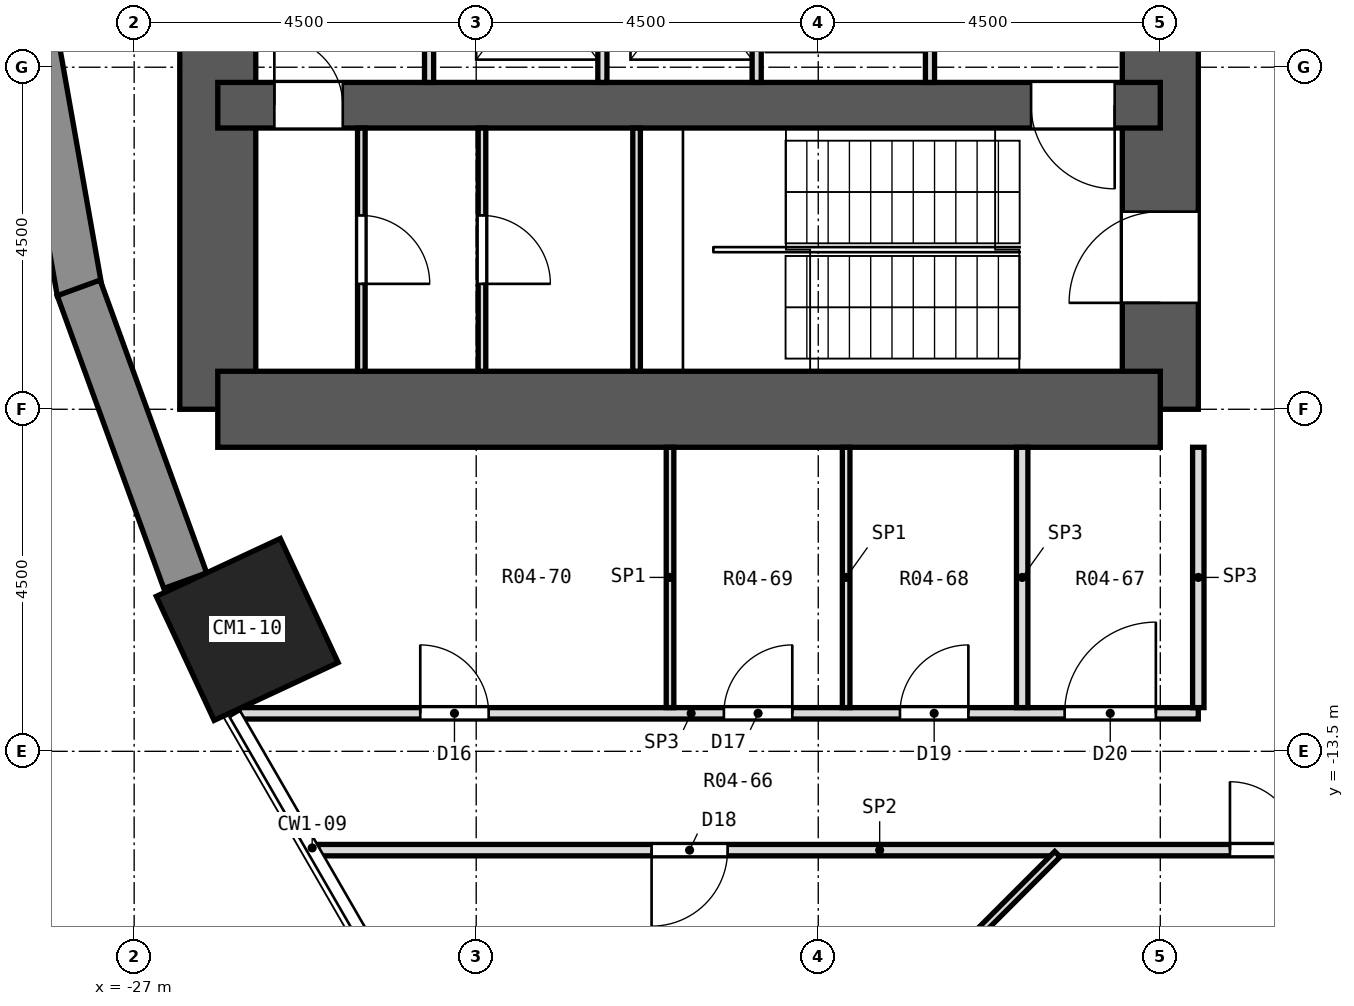
"""IFC4 building model, lengths in metres.
Left out: names, types, materials, properties, quantities, classifications, styles, units other than length and angle.
Written with IfcOpenShell. Run it as: python <this file> out.ifc"""

import sys

from ifc_helpers import new_model, si_unit, direction, frame, frame_2d, origin, origin_2d, place, context, subcontext, project, spatial, rectangle, extrude, element, fill, save


model = new_model("IFC4")
c1 = context("Model", 3, precision=1e-05, world=origin(), true_north=direction((0.0, 1.0)))
c2 = subcontext(c1, "Body", "Model", "MODEL_VIEW")
j1 = project(units=[si_unit("LENGTHUNIT", "METRE"), si_unit("PLANEANGLEUNIT", "RADIAN")], contexts=[c1])
p1 = place(None, origin())
s1 = spatial("IfcSite", under=j1, at=p1, CompositionType="ELEMENT")
p2 = place(p1, origin())
s2 = spatial("IfcBuilding", under=s1, at=p2, CompositionType="ELEMENT")
p3 = place(p2, frame((0.0, 0.0, 5.0)))
s3 = spatial("IfcBuildingStorey", under=s2, at=p3, CompositionType="ELEMENT", Elevation=5.0)
p4 = place(p3, frame((-25.512, -11.897, 0.0), z_axis=(0.0, 0.0, 1.0), x_axis=(-0.906307787037, -0.422618261741, 0.0)))
e1 = element("IfcColumn", 1, at=p4, inside=s3, PredefinedType="COLUMN", context=c2, shape_type="SweptSolid", body=[
    extrude(rectangle(XDim=1.8, YDim=1.8, at=origin_2d()), origin(), (0.0, 0.0, 1.0), 4.2),
])
p5 = place(p3, frame((-13.5, -9.0, 0.0), z_axis=(0.0, 0.0, 1.0), x_axis=(0.0, 1.0, 0.0)))
e2 = element("IfcWall", 2, at=p5, inside=s3, PredefinedType="SHEAR", context=c2, shape_type="SweptSolid", body=[
    extrude(rectangle(XDim=18.0, YDim=1.0, at=frame_2d((9.0, 0.0))), origin(), (0.0, 0.0, 1.0), 4.2),
])
p6 = place(p5, frame((15.4, 0.0, 0.0)))
e3 = element("IfcOpeningElement", 3, at=p6, cuts=e2, PredefinedType="OPENING", context=c2, shape_type="SweptSolid", body=[
    extrude(rectangle(XDim=1.2, YDim=2.1, at=frame_2d((0.6, 1.05))), frame((0.0, 0.512, 0.0), z_axis=(0.0, -1.0, 0.0), x_axis=(1.0, 0.0, 0.0)), (0.0, 0.0, 1.0), 1.024),
])
p7 = place(p5, frame((1.4, 0.0, 0.0)))
e4 = element("IfcOpeningElement", 4, at=p7, cuts=e2, PredefinedType="OPENING", context=c2, shape_type="SweptSolid", body=[
    extrude(rectangle(XDim=1.2, YDim=2.1, at=frame_2d((0.6, 1.05))), frame((0.0, 0.512, 0.0), z_axis=(0.0, -1.0, 0.0), x_axis=(1.0, 0.0, 0.0)), (0.0, 0.0, 1.0), 1.024),
])
p8 = place(p5, frame((7.5, 0.0, 0.0)))
e5 = element("IfcOpeningElement", 5, at=p8, cuts=e2, PredefinedType="OPENING", context=c2, shape_type="SweptSolid", body=[
    extrude(rectangle(XDim=3.0, YDim=2.4, at=frame_2d((1.5, 1.2))), frame((0.0, 0.512, 0.0), z_axis=(0.0, -1.0, 0.0), x_axis=(1.0, 0.0, 0.0)), (0.0, 0.0, 1.0), 1.024),
])
p9 = place(p3, frame((-25.9, -9.0, 0.0), z_axis=(0.0, 0.0, 1.0), x_axis=(0.0, 1.0, 0.0)))
e6 = element("IfcWall", 6, at=p9, inside=s3, PredefinedType="SHEAR", context=c2, shape_type="SweptSolid", body=[
    extrude(rectangle(XDim=18.0, YDim=1.0, at=frame_2d((9.0, 0.0))), origin(), (0.0, 0.0, 1.0), 4.2),
])
p10 = place(p3, frame((-13.5, -9.0, 0.0), z_axis=(0.0, 0.0, 1.0), x_axis=(-1.0, 0.0, 0.0)))
e7 = element("IfcWall", 7, at=p10, inside=s3, PredefinedType="SHEAR", context=c2, shape_type="SweptSolid", body=[
    extrude(rectangle(XDim=12.4, YDim=1.0, at=frame_2d((6.2, 0.0))), origin(), (0.0, 0.0, 1.0), 4.2),
])
p11 = place(p3, frame((-13.5, -5.0, 0.0), z_axis=(0.0, 0.0, 1.0), x_axis=(-1.0, 0.0, 0.0)))
e8 = element("IfcWall", 8, at=p11, inside=s3, PredefinedType="SHEAR", context=c2, shape_type="SweptSolid", body=[
    extrude(rectangle(XDim=12.4, YDim=0.6, at=frame_2d((6.2, 0.0))), origin(), (0.0, 0.0, 1.0), 4.2),
])
p12 = place(p11, frame((10.756, 0.0, 0.0)))
e9 = element("IfcOpeningElement", 9, at=p12, cuts=e8, PredefinedType="OPENING", context=c2, shape_type="SweptSolid", body=[
    extrude(rectangle(XDim=0.9, YDim=2.1, at=frame_2d((0.45, 1.05))), frame((0.0, 0.312, 0.0), z_axis=(0.0, -1.0, 0.0), x_axis=(1.0, 0.0, 0.0)), (0.0, 0.0, 1.0), 0.624),
])
p13 = place(p11, frame((0.6, 0.0, 0.0)))
e10 = element("IfcOpeningElement", 10, at=p13, cuts=e8, PredefinedType="OPENING", context=c2, shape_type="SweptSolid", body=[
    extrude(rectangle(XDim=1.1, YDim=2.1, at=frame_2d((0.55, 1.05))), frame((0.0, 0.312, 0.0), z_axis=(0.0, -1.0, 0.0), x_axis=(1.0, 0.0, 0.0)), (0.0, 0.0, 1.0), 0.624),
])
p14 = place(p3, frame((-28.428, -3.417, 0.0), z_axis=(0.0, 0.0, 1.0), x_axis=(0.173673210505, -0.984803338719, 0.0)))
e11 = element("IfcWall", 11, at=p14, inside=s3, PredefinedType="SOLIDWALL", context=c2, shape_type="SweptSolid", body=[
    extrude(rectangle(XDim=4.099, YDim=0.6, at=frame_2d((2.05, 0.0))), origin(), (0.0, 0.0, 1.0), 3.65),
])
p15 = place(p3, frame((-27.73, -7.403, 0.0), z_axis=(0.0, 0.0, 1.0), x_axis=(0.342034744565, -0.939687306241, 0.0)))
e12 = element("IfcWall", 12, at=p15, inside=s3, PredefinedType="SOLIDWALL", context=c2, shape_type="SweptSolid", body=[
    extrude(rectangle(XDim=4.099, YDim=0.6, at=frame_2d((2.05, 0.0))), origin(), (0.0, 0.0, 1.0), 3.65),
])
p16 = place(p3, frame((-24.583, -14.8, 0.0), z_axis=(0.0, 0.0, 1.0), x_axis=(1.0, 0.0, 0.0)))
e13 = element("IfcWall", 13, at=p16, inside=s3, PredefinedType="PARTITIONING", context=c2, shape_type="SweptSolid", body=[
    extrude(rectangle(XDim=14.783, YDim=0.15, at=frame_2d((7.392, 0.0))), origin(), (0.0, 0.0, 1.0), 3.65),
])
p17 = place(p16, frame((4.39, 0.0, 0.0)))
e14 = element("IfcOpeningElement", 14, at=p17, cuts=e13, PredefinedType="OPENING", context=c2, shape_type="SweptSolid", body=[
    extrude(rectangle(XDim=1.0, YDim=2.1, at=frame_2d((0.5, 1.05))), frame((0.0, 0.087, 0.0), z_axis=(0.0, -1.0, 0.0), x_axis=(1.0, 0.0, 0.0)), (0.0, 0.0, 1.0), 0.174),
])
p18 = place(p16, frame((12.0, 0.0, 0.0)))
e15 = element("IfcOpeningElement", 15, at=p18, cuts=e13, PredefinedType="OPENING", context=c2, shape_type="SweptSolid", body=[
    extrude(rectangle(XDim=1.8, YDim=2.1, at=frame_2d((0.9, 1.05))), frame((0.0, 0.087, 0.0), z_axis=(0.0, -1.0, 0.0), x_axis=(1.0, 0.0, 0.0)), (0.0, 0.0, 1.0), 0.174),
])
p19 = place(p3, frame((-25.622, -13.0, 0.0), z_axis=(0.0, 0.0, 1.0), x_axis=(1.0, 0.0, 0.0)))
e16 = element("IfcWall", 16, at=p19, inside=s3, PredefinedType="PARTITIONING", context=c2, shape_type="SweptSolid", body=[
    extrude(rectangle(XDim=12.622, YDim=0.15, at=frame_2d((6.311, 0.0))), origin(), (0.0, 0.0, 1.0), 3.65),
])
p20 = place(p19, frame((2.386, 0.0, 0.0)))
e17 = element("IfcOpeningElement", 17, at=p20, cuts=e16, PredefinedType="OPENING", context=c2, shape_type="SweptSolid", body=[
    extrude(rectangle(XDim=0.9, YDim=2.1, at=frame_2d((0.45, 1.05))), frame((0.0, 0.087, 0.0), z_axis=(0.0, -1.0, 0.0), x_axis=(1.0, 0.0, 0.0)), (0.0, 0.0, 1.0), 0.174),
])
p21 = place(p19, frame((6.381, 0.0, 0.0)))
e18 = element("IfcOpeningElement", 18, at=p21, cuts=e16, PredefinedType="OPENING", context=c2, shape_type="SweptSolid", body=[
    extrude(rectangle(XDim=0.9, YDim=2.1, at=frame_2d((0.45, 1.05))), frame((0.0, 0.087, 0.0), z_axis=(0.0, -1.0, 0.0), x_axis=(1.0, 0.0, 0.0)), (0.0, 0.0, 1.0), 0.174),
])
p22 = place(p19, frame((8.697, 0.0, 0.0)))
e19 = element("IfcOpeningElement", 19, at=p22, cuts=e16, PredefinedType="OPENING", context=c2, shape_type="SweptSolid", body=[
    extrude(rectangle(XDim=0.9, YDim=2.1, at=frame_2d((0.45, 1.05))), frame((0.0, 0.087, 0.0), z_axis=(0.0, -1.0, 0.0), x_axis=(1.0, 0.0, 0.0)), (0.0, 0.0, 1.0), 0.174),
])
p23 = place(p19, frame((10.864, 0.0, 0.0)))
e20 = element("IfcOpeningElement", 20, at=p23, cuts=e16, PredefinedType="OPENING", context=c2, shape_type="SweptSolid", body=[
    extrude(rectangle(XDim=1.2, YDim=2.1, at=frame_2d((0.6, 1.05))), frame((0.0, 0.087, 0.0), z_axis=(0.0, -1.0, 0.0), x_axis=(1.0, 0.0, 0.0)), (0.0, 0.0, 1.0), 0.174),
])
p24 = place(p3, frame((-19.262, -19.262, 0.0), z_axis=(0.0, 0.0, 1.0), x_axis=(0.707106781187, 0.707106781187, 0.0)))
e21 = element("IfcWall", 21, at=p24, inside=s3, PredefinedType="PARTITIONING", context=c2, shape_type="SweptSolid", body=[
    extrude(rectangle(XDim=6.235, YDim=0.1, at=frame_2d((3.117, 0.0))), origin(), (0.0, 0.0, 1.0), 3.65),
])
p25 = place(p3, frame((-16.519, -23.591, 0.0), z_axis=(0.0, 0.0, 1.0), x_axis=(0.573602246075, 0.81913397152, 0.0)))
e22 = element("IfcWall", 22, at=p25, inside=s3, PredefinedType="PARTITIONING", context=c2, shape_type="SweptSolid", body=[
    extrude(rectangle(XDim=10.657, YDim=0.1, at=frame_2d((5.329, 0.0))), origin(), (0.0, 0.0, 1.0), 3.65),
])
p26 = place(p25, frame((4.866, 0.0, 0.0)))
e23 = element("IfcOpeningElement", 23, at=p26, cuts=e22, PredefinedType="OPENING", context=c2, shape_type="SweptSolid", body=[
    extrude(rectangle(XDim=1.0, YDim=2.1, at=frame_2d((0.5, 1.05))), frame((0.0, 0.062, 0.0), z_axis=(0.0, -1.0, 0.0), x_axis=(1.0, 0.0, 0.0)), (0.0, 0.0, 1.0), 0.124),
])
for number, where, z_axis, x_axis in (
    (24, (-13.0, -12.925, 0.0), (0.0, 0.0, 1.0), (0.0, 1.0, 0.0)),
    (25, (-15.317, -12.925, 0.0), (0.0, 0.0, 1.0), (0.0, 1.0, 0.0)),
):
    element("IfcWall", number, at=place(p3, frame(where, z_axis=z_axis, x_axis=x_axis)), inside=s3, PredefinedType="PARTITIONING", context=c2, shape_type="SweptSolid", body=[
        extrude(rectangle(XDim=3.425, YDim=0.15, at=frame_2d((1.712, 0.0))), origin(), (0.0, 0.0, 1.0), 3.65),
    ])
for number, where, z_axis, x_axis in (
    (26, (-17.633, -12.925, 0.0), (0.0, 0.0, 1.0), (0.0, 1.0, 0.0)),
    (27, (-19.95, -12.925, 0.0), (0.0, 0.0, 1.0), (0.0, 1.0, 0.0)),
):
    element("IfcWall", number, at=place(p3, frame(where, z_axis=z_axis, x_axis=x_axis)), inside=s3, PredefinedType="PARTITIONING", context=c2, shape_type="SweptSolid", body=[
        extrude(rectangle(XDim=3.425, YDim=0.1, at=frame_2d((1.712, 0.0))), origin(), (0.0, 0.0, 1.0), 3.65),
    ])
p27 = place(p3, frame((-16.53, -4.7, 0.0), z_axis=(0.0, 0.0, 1.0), x_axis=(0.0, 1.0, 0.0)))
e28 = element("IfcWall", 28, at=p27, inside=s3, PredefinedType="PARTITIONING", context=c2, shape_type="SweptSolid", body=[
    extrude(rectangle(XDim=2.4, YDim=0.12, at=frame_2d((1.2, 0.0))), origin(), (0.0, 0.0, 1.0), 3.65),
])
p28 = place(p27, frame((0.65, 0.0, 0.0)))
e29 = element("IfcOpeningElement", 29, at=p28, cuts=e28, PredefinedType="OPENING", context=c2, shape_type="SweptSolid", body=[
    extrude(rectangle(XDim=1.1, YDim=2.1, at=frame_2d((0.55, 1.05))), frame((0.0, 0.072, 0.0), z_axis=(0.0, -1.0, 0.0), x_axis=(1.0, 0.0, 0.0)), (0.0, 0.0, 1.0), 0.144),
])
for number, where, z_axis, x_axis in (
    (30, (-18.81, -4.7, 0.0), (0.0, 0.0, 1.0), (0.0, 1.0, 0.0)),
    (31, (-20.84, -4.7, 0.0), (0.0, 0.0, 1.0), (0.0, 1.0, 0.0)),
    (32, (-23.12, -4.7, 0.0), (0.0, 0.0, 1.0), (0.0, 1.0, 0.0)),
):
    element("IfcWall", number, at=place(p3, frame(where, z_axis=z_axis, x_axis=x_axis)), inside=s3, PredefinedType="PARTITIONING", context=c2, shape_type="SweptSolid", body=[
        extrude(rectangle(XDim=2.4, YDim=0.12, at=frame_2d((1.2, 0.0))), origin(), (0.0, 0.0, 1.0), 3.65),
    ])
p29 = place(p3, frame((-20.39, -8.5, 0.0), z_axis=(0.0, 0.0, 1.0), x_axis=(0.0, 1.0, 0.0)))
e33 = element("IfcWall", 33, at=p29, inside=s3, PredefinedType="PARTITIONING", context=c2, shape_type="SweptSolid", body=[
    extrude(rectangle(XDim=3.2, YDim=0.1, at=frame_2d((1.6, 0.0))), origin(), (0.0, 0.0, 1.0), 3.65),
])
p30 = place(p3, frame((-22.424, -8.5, 0.0), z_axis=(0.0, 0.0, 1.0), x_axis=(0.0, 1.0, 0.0)))
e34 = element("IfcWall", 34, at=p30, inside=s3, PredefinedType="PARTITIONING", context=c2, shape_type="SweptSolid", body=[
    extrude(rectangle(XDim=3.2, YDim=0.1, at=frame_2d((1.6, 0.0))), origin(), (0.0, 0.0, 1.0), 3.65),
])
p31 = place(p30, frame((1.15, 0.0, 0.0)))
e35 = element("IfcOpeningElement", 35, at=p31, cuts=e34, PredefinedType="OPENING", context=c2, shape_type="SweptSolid", body=[
    extrude(rectangle(XDim=0.9, YDim=2.1, at=frame_2d((0.45, 1.05))), frame((0.0, 0.062, 0.0), z_axis=(0.0, -1.0, 0.0), x_axis=(1.0, 0.0, 0.0)), (0.0, 0.0, 1.0), 0.124),
])
p32 = place(p3, frame((-24.011, -8.5, 0.0), z_axis=(0.0, 0.0, 1.0), x_axis=(0.0, 1.0, 0.0)))
e36 = element("IfcWall", 36, at=p32, inside=s3, PredefinedType="PARTITIONING", context=c2, shape_type="SweptSolid", body=[
    extrude(rectangle(XDim=3.2, YDim=0.1, at=frame_2d((1.6, 0.0))), origin(), (0.0, 0.0, 1.0), 3.65),
])
p33 = place(p32, frame((1.15, 0.0, 0.0)))
e37 = element("IfcOpeningElement", 37, at=p33, cuts=e36, PredefinedType="OPENING", context=c2, shape_type="SweptSolid", body=[
    extrude(rectangle(XDim=0.9, YDim=2.1, at=frame_2d((0.45, 1.05))), frame((0.0, 0.062, 0.0), z_axis=(0.0, -1.0, 0.0), x_axis=(1.0, 0.0, 0.0)), (0.0, 0.0, 1.0), 0.124),
])
p34 = place(p20, origin())
e38 = element("IfcDoor", 38, at=p34, inside=s3, OperationType="SINGLE_SWING_LEFT", PredefinedType="DOOR", context=c2, shape_type="SweptSolid", body=[
    extrude(rectangle(XDim=0.9, YDim=2.1, at=frame_2d((0.45, 1.05))), frame((0.0, 0.025, 0.0), z_axis=(0.0, -1.0, 0.0), x_axis=(1.0, 0.0, 0.0)), (0.0, 0.0, 1.0), 0.05),
])
fill(e17, e38)
p35 = place(p21, origin())
e39 = element("IfcDoor", 39, at=p35, inside=s3, OperationType="SINGLE_SWING_RIGHT", PredefinedType="DOOR", context=c2, shape_type="SweptSolid", body=[
    extrude(rectangle(XDim=0.9, YDim=2.1, at=frame_2d((0.45, 1.05))), frame((0.0, 0.025, 0.0), z_axis=(0.0, -1.0, 0.0), x_axis=(1.0, 0.0, 0.0)), (0.0, 0.0, 1.0), 0.05),
])
fill(e18, e39)
p36 = place(p17, frame((1.0, 0.0, 0.0), z_axis=(0.0, 0.0, 1.0), x_axis=(-1.0, 0.0, 0.0)))
e40 = element("IfcDoor", 40, at=p36, inside=s3, OperationType="SINGLE_SWING_RIGHT", PredefinedType="DOOR", context=c2, shape_type="SweptSolid", body=[
    extrude(rectangle(XDim=1.0, YDim=2.1, at=frame_2d((0.5, 1.05))), frame((0.0, 0.025, 0.0), z_axis=(0.0, -1.0, 0.0), x_axis=(1.0, 0.0, 0.0)), (0.0, 0.0, 1.0), 0.05),
])
fill(e14, e40)
p37 = place(p22, origin())
e41 = element("IfcDoor", 41, at=p37, inside=s3, OperationType="SINGLE_SWING_RIGHT", PredefinedType="DOOR", context=c2, shape_type="SweptSolid", body=[
    extrude(rectangle(XDim=0.9, YDim=2.1, at=frame_2d((0.45, 1.05))), frame((0.0, 0.025, 0.0), z_axis=(0.0, -1.0, 0.0), x_axis=(1.0, 0.0, 0.0)), (0.0, 0.0, 1.0), 0.05),
])
fill(e19, e41)
p38 = place(p23, origin())
e42 = element("IfcDoor", 42, at=p38, inside=s3, OperationType="SINGLE_SWING_RIGHT", PredefinedType="DOOR", context=c2, shape_type="SweptSolid", body=[
    extrude(rectangle(XDim=1.2, YDim=2.1, at=frame_2d((0.6, 1.05))), frame((0.0, 0.025, 0.0), z_axis=(0.0, -1.0, 0.0), x_axis=(1.0, 0.0, 0.0)), (0.0, 0.0, 1.0), 0.05),
])
fill(e20, e42)
p39 = place(p18, origin())
e43 = element("IfcDoor", 43, at=p39, inside=s3, OperationType="DOUBLE_DOOR_SINGLE_SWING", PredefinedType="DOOR", context=c2, shape_type="SweptSolid", body=[
    extrude(rectangle(XDim=1.8, YDim=2.1, at=frame_2d((0.9, 1.05))), frame((0.0, 0.025, 0.0), z_axis=(0.0, -1.0, 0.0), x_axis=(1.0, 0.0, 0.0)), (0.0, 0.0, 1.0), 0.05),
])
fill(e15, e43)
p40 = place(p33, frame((0.9, 0.0, 0.0), z_axis=(0.0, 0.0, 1.0), x_axis=(-1.0, 0.0, 0.0)))
e44 = element("IfcDoor", 44, at=p40, inside=s3, OperationType="SINGLE_SWING_RIGHT", PredefinedType="DOOR", context=c2, shape_type="SweptSolid", body=[
    extrude(rectangle(XDim=0.9, YDim=2.1, at=frame_2d((0.45, 1.05))), frame((0.0, 0.025, 0.0), z_axis=(0.0, -1.0, 0.0), x_axis=(1.0, 0.0, 0.0)), (0.0, 0.0, 1.0), 0.05),
])
fill(e37, e44)
p41 = place(p31, frame((0.9, 0.0, 0.0), z_axis=(0.0, 0.0, 1.0), x_axis=(-1.0, 0.0, 0.0)))
e45 = element("IfcDoor", 45, at=p41, inside=s3, OperationType="SINGLE_SWING_RIGHT", PredefinedType="DOOR", context=c2, shape_type="SweptSolid", body=[
    extrude(rectangle(XDim=0.9, YDim=2.1, at=frame_2d((0.45, 1.05))), frame((0.0, 0.025, 0.0), z_axis=(0.0, -1.0, 0.0), x_axis=(1.0, 0.0, 0.0)), (0.0, 0.0, 1.0), 0.05),
])
fill(e35, e45)
p42 = place(p12, frame((0.9, 0.0, 0.0), z_axis=(0.0, 0.0, 1.0), x_axis=(-1.0, 0.0, 0.0)))
e46 = element("IfcDoor", 46, at=p42, inside=s3, OperationType="SINGLE_SWING_LEFT", PredefinedType="DOOR", context=c2, shape_type="SweptSolid", body=[
    extrude(rectangle(XDim=0.9, YDim=2.1, at=frame_2d((0.45, 1.05))), frame((0.0, 0.025, 0.0), z_axis=(0.0, -1.0, 0.0), x_axis=(1.0, 0.0, 0.0)), (0.0, 0.0, 1.0), 0.05),
])
fill(e9, e46)
p43 = place(p13, origin())
e47 = element("IfcDoor", 47, at=p43, inside=s3, OperationType="SINGLE_SWING_LEFT", PredefinedType="DOOR", context=c2, shape_type="SweptSolid", body=[
    extrude(rectangle(XDim=1.1, YDim=2.1, at=frame_2d((0.55, 1.05))), frame((0.0, 0.025, 0.0), z_axis=(0.0, -1.0, 0.0), x_axis=(1.0, 0.0, 0.0)), (0.0, 0.0, 1.0), 0.05),
])
fill(e10, e47)
p44 = place(p7, origin())
e48 = element("IfcDoor", 48, at=p44, inside=s3, OperationType="SINGLE_SWING_LEFT", PredefinedType="DOOR", context=c2, shape_type="SweptSolid", body=[
    extrude(rectangle(XDim=1.2, YDim=2.1, at=frame_2d((0.6, 1.05))), frame((0.0, 0.025, 0.0), z_axis=(0.0, -1.0, 0.0), x_axis=(1.0, 0.0, 0.0)), (0.0, 0.0, 1.0), 0.05),
])
fill(e4, e48)
save(model, sys.argv[1])
